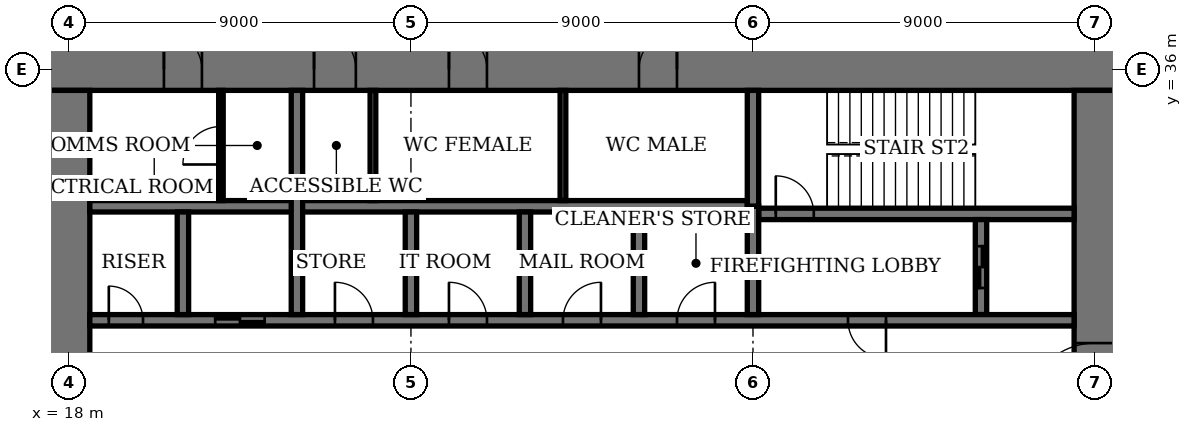
"""IFC4 building model, lengths in metres.
Left out: names, types, materials, properties, quantities, classifications, styles, units other than length and angle.
Written with IfcOpenShell. Run it as: python <this file> out.ifc"""

import sys

from ifc_helpers import new_model, si_unit, direction, frame, frame_2d, origin, place, context, subcontext, project, spatial, rectangle, extrude, element, fill, save


model = new_model("IFC4")
c1 = context("Model", 3, precision=1e-05, world=origin(), true_north=direction((0.0, 1.0)))
c2 = subcontext(c1, "Body", "Model", "MODEL_VIEW")
j1 = project(units=[si_unit("LENGTHUNIT", "METRE"), si_unit("PLANEANGLEUNIT", "RADIAN")], contexts=[c1])
p1 = place(None, origin())
s1 = spatial("IfcSite", under=j1, at=p1, CompositionType="ELEMENT")
p2 = place(p1, origin())
s2 = spatial("IfcBuilding", under=s1, at=p2, CompositionType="ELEMENT")
p3 = place(p2, frame((0.0, 0.0, 279.4)))
s3 = spatial("IfcBuildingStorey", under=s2, at=p3, CompositionType="ELEMENT", Elevation=279.4)
p4 = place(p3, frame((45.55, 36.0, 0.0), z_axis=(0.0, 0.0, 1.0), x_axis=(-1.0, 0.0, 0.0)))
e1 = element("IfcWall", 1, at=p4, inside=s3, PredefinedType="SHEAR", context=c2, shape_type="SweptSolid", body=[
    extrude(rectangle(XDim=28.1, YDim=1.1, at=frame_2d((14.05, 0.0))), origin(), (0.0, 0.0, 1.0), 4.0),
])
p5 = place(p4, frame((11.55, 0.0, 0.0)))
e2 = element("IfcOpeningElement", 2, at=p5, cuts=e1, PredefinedType="OPENING", context=c2, shape_type="SweptSolid", body=[
    extrude(rectangle(XDim=1.0, YDim=2.4, at=frame_2d((0.5, 1.2))), frame((0.0, 0.56, 0.0), z_axis=(0.0, -1.0, 0.0), x_axis=(1.0, 0.0, 0.0)), (0.0, 0.0, 1.0), 1.12),
])
p6 = place(p4, frame((16.55, 0.0, 0.0)))
e3 = element("IfcOpeningElement", 3, at=p6, cuts=e1, PredefinedType="OPENING", context=c2, shape_type="SweptSolid", body=[
    extrude(rectangle(XDim=1.0, YDim=2.4, at=frame_2d((0.5, 1.2))), frame((0.0, 0.56, 0.0), z_axis=(0.0, -1.0, 0.0), x_axis=(1.0, 0.0, 0.0)), (0.0, 0.0, 1.0), 1.12),
])
p7 = place(p4, frame((20.0, 0.0, 0.0)))
e4 = element("IfcOpeningElement", 4, at=p7, cuts=e1, PredefinedType="OPENING", context=c2, shape_type="SweptSolid", body=[
    extrude(rectangle(XDim=1.1, YDim=2.4, at=frame_2d((0.55, 1.2))), frame((0.0, 0.56, 0.0), z_axis=(0.0, -1.0, 0.0), x_axis=(1.0, 0.0, 0.0)), (0.0, 0.0, 1.0), 1.12),
])
p8 = place(p4, frame((24.05, 0.0, 0.0)))
e5 = element("IfcOpeningElement", 5, at=p8, cuts=e1, PredefinedType="OPENING", context=c2, shape_type="SweptSolid", body=[
    extrude(rectangle(XDim=1.0, YDim=2.4, at=frame_2d((0.5, 1.2))), frame((0.0, 0.56, 0.0), z_axis=(0.0, -1.0, 0.0), x_axis=(1.0, 0.0, 0.0)), (0.0, 0.0, 1.0), 1.12),
])
p9 = place(p3, frame((18.0, 35.45, 0.0), z_axis=(0.0, 0.0, 1.0), x_axis=(0.0, -1.0, 0.0)))
e6 = element("IfcWall", 6, at=p9, inside=s3, PredefinedType="SHEAR", context=c2, shape_type="SweptSolid", body=[
    extrude(rectangle(XDim=16.9, YDim=1.1, at=frame_2d((8.45, 0.0))), origin(), (0.0, 0.0, 1.0), 4.0),
])
p10 = place(p9, frame((8.45, 0.0, 0.0)))
e7 = element("IfcOpeningElement", 7, at=p10, cuts=e6, PredefinedType="OPENING", context=c2, shape_type="SweptSolid", body=[
    extrude(rectangle(XDim=1.8, YDim=2.4, at=frame_2d((0.9, 1.2))), frame((0.0, 0.56, 0.0), z_axis=(0.0, -1.0, 0.0), x_axis=(1.0, 0.0, 0.0)), (0.0, 0.0, 1.0), 1.12),
])
p11 = place(p3, frame((45.0, 18.55, 0.0), z_axis=(0.0, 0.0, 1.0), x_axis=(0.0, 1.0, 0.0)))
e8 = element("IfcWall", 8, at=p11, inside=s3, PredefinedType="SHEAR", context=c2, shape_type="SweptSolid", body=[
    extrude(rectangle(XDim=16.9, YDim=1.1, at=frame_2d((8.45, 0.0))), origin(), (0.0, 0.0, 1.0), 4.0),
])
p12 = place(p11, frame((8.45, 0.0, 0.0)))
e9 = element("IfcOpeningElement", 9, at=p12, cuts=e8, PredefinedType="OPENING", context=c2, shape_type="SweptSolid", body=[
    extrude(rectangle(XDim=1.8, YDim=2.4, at=frame_2d((0.9, 1.2))), frame((0.0, 0.56, 0.0), z_axis=(0.0, -1.0, 0.0), x_axis=(1.0, 0.0, 0.0)), (0.0, 0.0, 1.0), 1.12),
])
p13 = place(p3, frame((36.15, 32.2, 0.0), z_axis=(0.0, 0.0, 1.0), x_axis=(1.0, 0.0, 0.0)))
e10 = element("IfcWall", 10, at=p13, inside=s3, PredefinedType="SHEAR", context=c2, shape_type="SweptSolid", body=[
    extrude(rectangle(XDim=8.3, YDim=0.3, at=frame_2d((4.15, 0.0))), origin(), (0.0, 0.0, 1.0), 4.0),
])
p14 = place(p13, frame((0.45, 0.0, 0.0)))
e11 = element("IfcOpeningElement", 11, at=p14, cuts=e10, PredefinedType="OPENING", context=c2, shape_type="SweptSolid", body=[
    extrude(rectangle(XDim=1.0, YDim=2.4, at=frame_2d((0.5, 1.2))), frame((0.0, 0.16, 0.0), z_axis=(0.0, -1.0, 0.0), x_axis=(1.0, 0.0, 0.0)), (0.0, 0.0, 1.0), 0.32),
])
p15 = place(p3, frame((36.0, 32.4, 0.0), z_axis=(0.0, 0.0, 1.0), x_axis=(0.0, 1.0, 0.0)))
e12 = element("IfcWall", 12, at=p15, inside=s3, PredefinedType="SHEAR", context=c2, shape_type="SweptSolid", body=[
    extrude(rectangle(XDim=3.05, YDim=0.3, at=frame_2d((1.525, 0.0))), origin(), (0.0, 0.0, 1.0), 4.0),
])
p16 = place(p3, frame((42.0, 29.55, 0.0), z_axis=(0.0, 0.0, 1.0), x_axis=(0.0, 1.0, 0.0)))
e13 = element("IfcWall", 13, at=p16, inside=s3, PredefinedType="SHEAR", context=c2, shape_type="SweptSolid", body=[
    extrude(rectangle(XDim=2.5, YDim=0.3, at=frame_2d((1.25, 0.0))), origin(), (0.0, 0.0, 1.0), 4.0),
])
p17 = place(p16, frame((0.7, 0.0, 0.0)))
e14 = element("IfcOpeningElement", 14, at=p17, cuts=e13, PredefinedType="OPENING", context=c2, shape_type="SweptSolid", body=[
    extrude(rectangle(XDim=1.1, YDim=2.4, at=frame_2d((0.55, 1.2))), frame((0.0, 0.16, 0.0), z_axis=(0.0, -1.0, 0.0), x_axis=(1.0, 0.0, 0.0)), (0.0, 0.0, 1.0), 0.32),
])
p18 = place(p3, frame((18.55, 29.4, 0.0), z_axis=(0.0, 0.0, 1.0), x_axis=(1.0, 0.0, 0.0)))
e15 = element("IfcWall", 15, at=p18, inside=s3, PredefinedType="SHEAR", context=c2, shape_type="SweptSolid", body=[
    extrude(rectangle(XDim=25.9, YDim=0.3, at=frame_2d((12.95, 0.0))), origin(), (0.0, 0.0, 1.0), 4.0),
])
p19 = place(p18, frame((19.95, 0.0, 0.0)))
e16 = element("IfcOpeningElement", 16, at=p19, cuts=e15, PredefinedType="OPENING", context=c2, shape_type="SweptSolid", body=[
    extrude(rectangle(XDim=1.0, YDim=2.4, at=frame_2d((0.5, 1.2))), frame((0.0, 0.16, 0.0), z_axis=(0.0, -1.0, 0.0), x_axis=(1.0, 0.0, 0.0)), (0.0, 0.0, 1.0), 0.32),
])
p20 = place(p18, frame((0.5, 0.0, 0.0)))
e17 = element("IfcOpeningElement", 17, at=p20, cuts=e15, PredefinedType="OPENING", context=c2, shape_type="SweptSolid", body=[
    extrude(rectangle(XDim=0.9, YDim=2.1, at=frame_2d((0.45, 1.05))), frame((0.0, 0.16, 0.0), z_axis=(0.0, -1.0, 0.0), x_axis=(1.0, 0.0, 0.0)), (0.0, 0.0, 1.0), 0.32),
])
p21 = place(p18, frame((15.45, 0.0, 0.0)))
e18 = element("IfcOpeningElement", 18, at=p21, cuts=e15, PredefinedType="OPENING", context=c2, shape_type="SweptSolid", body=[
    extrude(rectangle(XDim=1.0, YDim=2.4, at=frame_2d((0.5, 1.2))), frame((0.0, 0.16, 0.0), z_axis=(0.0, -1.0, 0.0), x_axis=(1.0, 0.0, 0.0)), (0.0, 0.0, 1.0), 0.32),
])
p22 = place(p18, frame((12.45, 0.0, 0.0)))
e19 = element("IfcOpeningElement", 19, at=p22, cuts=e15, PredefinedType="OPENING", context=c2, shape_type="SweptSolid", body=[
    extrude(rectangle(XDim=1.0, YDim=2.4, at=frame_2d((0.5, 1.2))), frame((0.0, 0.16, 0.0), z_axis=(0.0, -1.0, 0.0), x_axis=(1.0, 0.0, 0.0)), (0.0, 0.0, 1.0), 0.32),
])
p23 = place(p18, frame((9.45, 0.0, 0.0)))
e20 = element("IfcOpeningElement", 20, at=p23, cuts=e15, PredefinedType="OPENING", context=c2, shape_type="SweptSolid", body=[
    extrude(rectangle(XDim=1.0, YDim=2.4, at=frame_2d((0.5, 1.2))), frame((0.0, 0.16, 0.0), z_axis=(0.0, -1.0, 0.0), x_axis=(1.0, 0.0, 0.0)), (0.0, 0.0, 1.0), 0.32),
])
p24 = place(p18, frame((6.45, 0.0, 0.0)))
e21 = element("IfcOpeningElement", 21, at=p24, cuts=e15, PredefinedType="OPENING", context=c2, shape_type="SweptSolid", body=[
    extrude(rectangle(XDim=1.0, YDim=2.4, at=frame_2d((0.5, 1.2))), frame((0.0, 0.16, 0.0), z_axis=(0.0, -1.0, 0.0), x_axis=(1.0, 0.0, 0.0)), (0.0, 0.0, 1.0), 0.32),
])
p25 = place(p18, frame((3.3, 0.0, 0.0)))
e22 = element("IfcOpeningElement", 22, at=p25, cuts=e15, PredefinedType="OPENING", context=c2, shape_type="SweptSolid", body=[
    extrude(rectangle(XDim=1.3, YDim=2.4, at=frame_2d((0.65, 1.2))), frame((0.0, 0.16, 0.0), z_axis=(0.0, -1.0, 0.0), x_axis=(1.0, 0.0, 0.0)), (0.0, 0.0, 1.0), 0.32),
])
p26 = place(p3, frame((18.55, 32.4, 0.0), z_axis=(0.0, 0.0, 1.0), x_axis=(1.0, 0.0, 0.0)))
e23 = element("IfcWall", 23, at=p26, inside=s3, PredefinedType="SHEAR", context=c2, shape_type="SweptSolid", body=[
    extrude(rectangle(XDim=17.3, YDim=0.3, at=frame_2d((8.65, 0.0))), origin(), (0.0, 0.0, 1.0), 4.0),
])
for number, where, z_axis, x_axis in (
    (24, (33.0, 29.55, 0.0), (0.0, 0.0, 1.0), (0.0, 1.0, 0.0)),
    (25, (30.0, 29.55, 0.0), (0.0, 0.0, 1.0), (0.0, 1.0, 0.0)),
    (26, (27.0, 29.55, 0.0), (0.0, 0.0, 1.0), (0.0, 1.0, 0.0)),
):
    element("IfcWall", number, at=place(p3, frame(where, z_axis=z_axis, x_axis=x_axis)), inside=s3, PredefinedType="SHEAR", context=c2, shape_type="SweptSolid", body=[
        extrude(rectangle(XDim=2.7, YDim=0.3, at=frame_2d((1.35, 0.0))), origin(), (0.0, 0.0, 1.0), 4.0),
    ])
p27 = place(p3, frame((24.0, 29.55, 0.0), z_axis=(0.0, 0.0, 1.0), x_axis=(0.0, 1.0, 0.0)))
e27 = element("IfcWall", 27, at=p27, inside=s3, PredefinedType="SHEAR", context=c2, shape_type="SweptSolid", body=[
    extrude(rectangle(XDim=5.9, YDim=0.3, at=frame_2d((2.95, 0.0))), origin(), (0.0, 0.0, 1.0), 4.0),
])
p28 = place(p3, frame((21.0, 29.55, 0.0), z_axis=(0.0, 0.0, 1.0), x_axis=(0.0, 1.0, 0.0)))
e28 = element("IfcWall", 28, at=p28, inside=s3, PredefinedType="SHEAR", context=c2, shape_type="SweptSolid", body=[
    extrude(rectangle(XDim=2.7, YDim=0.3, at=frame_2d((1.35, 0.0))), origin(), (0.0, 0.0, 1.0), 4.0),
])
p29 = place(p3, frame((36.0, 29.55, 0.0), z_axis=(0.0, 0.0, 1.0), x_axis=(0.0, 1.0, 0.0)))
e29 = element("IfcWall", 29, at=p29, inside=s3, PredefinedType="SHEAR", context=c2, shape_type="SweptSolid", body=[
    extrude(rectangle(XDim=2.85, YDim=0.3, at=frame_2d((1.425, 0.0))), origin(), (0.0, 0.0, 1.0), 4.0),
])
for number, where, z_axis, x_axis in (
    (30, (31.0, 32.55, 0.0), (0.0, 0.0, 1.0), (0.0, 1.0, 0.0)),
    (31, (26.0, 32.55, 0.0), (0.0, 0.0, 1.0), (0.0, 1.0, 0.0)),
):
    element("IfcWall", number, at=place(p3, frame(where, z_axis=z_axis, x_axis=x_axis)), inside=s3, PredefinedType="PARTITIONING", context=c2, shape_type="SweptSolid", body=[
        extrude(rectangle(XDim=2.9, YDim=0.15, at=frame_2d((1.45, 0.0))), origin(), (0.0, 0.0, 1.0), 3.75),
    ])
p30 = place(p3, frame((22.0, 32.55, 0.0), z_axis=(0.0, 0.0, 1.0), x_axis=(0.0, 1.0, 0.0)))
e32 = element("IfcWall", 32, at=p30, inside=s3, PredefinedType="PARTITIONING", context=c2, shape_type="SweptSolid", body=[
    extrude(rectangle(XDim=2.9, YDim=0.12, at=frame_2d((1.45, 0.0))), origin(), (0.0, 0.0, 1.0), 3.75),
])
p31 = place(p30, frame((0.95, 0.0, 0.0)))
e33 = element("IfcOpeningElement", 33, at=p31, cuts=e32, PredefinedType="OPENING", context=c2, shape_type="SweptSolid", body=[
    extrude(rectangle(XDim=1.0, YDim=2.4, at=frame_2d((0.5, 1.2))), frame((0.0, 0.07, 0.0), z_axis=(0.0, -1.0, 0.0), x_axis=(1.0, 0.0, 0.0)), (0.0, 0.0, 1.0), 0.14),
])
p32 = place(p12, origin())
e34 = element("IfcDoor", 34, at=p32, inside=s3, OperationType="DOUBLE_DOOR_DOUBLE_SWING", PredefinedType="DOOR", context=c2, shape_type="SweptSolid", body=[
    extrude(rectangle(XDim=1.8, YDim=2.4, at=frame_2d((0.9, 1.2))), frame((0.0, 0.03, 0.0), z_axis=(0.0, -1.0, 0.0), x_axis=(1.0, 0.0, 0.0)), (0.0, 0.0, 1.0), 0.06),
    extrude(rectangle(XDim=0.04, YDim=2.4, at=frame_2d((0.02, 1.2))), frame((0.0, 0.55, 0.0), z_axis=(0.0, -1.0, 0.0), x_axis=(1.0, 0.0, 0.0)), (0.0, 0.0, 1.0), 1.1),
    extrude(rectangle(XDim=0.04, YDim=2.4, at=frame_2d((1.78, 1.2))), frame((0.0, 0.55, 0.0), z_axis=(0.0, -1.0, 0.0), x_axis=(1.0, 0.0, 0.0)), (0.0, 0.0, 1.0), 1.1),
    extrude(rectangle(XDim=1.8, YDim=0.04, at=frame_2d((0.9, 2.38))), frame((0.0, 0.55, 0.0), z_axis=(0.0, -1.0, 0.0), x_axis=(1.0, 0.0, 0.0)), (0.0, 0.0, 1.0), 1.1),
])
fill(e9, e34)
p33 = place(p5, origin())
e35 = element("IfcDoor", 35, at=p33, inside=s3, OperationType="SINGLE_SWING_LEFT", PredefinedType="DOOR", context=c2, shape_type="SweptSolid", body=[
    extrude(rectangle(XDim=1.0, YDim=2.4, at=frame_2d((0.5, 1.2))), frame((0.0, 0.025, 0.0), z_axis=(0.0, -1.0, 0.0), x_axis=(1.0, 0.0, 0.0)), (0.0, 0.0, 1.0), 0.05),
    extrude(rectangle(XDim=0.04, YDim=2.4, at=frame_2d((0.02, 1.2))), frame((0.0, 0.4, 0.0), z_axis=(0.0, -1.0, 0.0), x_axis=(1.0, 0.0, 0.0)), (0.0, 0.0, 1.0), 0.8),
    extrude(rectangle(XDim=0.04, YDim=2.4, at=frame_2d((0.98, 1.2))), frame((0.0, 0.4, 0.0), z_axis=(0.0, -1.0, 0.0), x_axis=(1.0, 0.0, 0.0)), (0.0, 0.0, 1.0), 0.8),
    extrude(rectangle(XDim=1.0, YDim=0.04, at=frame_2d((0.5, 2.38))), frame((0.0, 0.4, 0.0), z_axis=(0.0, -1.0, 0.0), x_axis=(1.0, 0.0, 0.0)), (0.0, 0.0, 1.0), 0.8),
])
fill(e2, e35)
p34 = place(p6, origin())
e36 = element("IfcDoor", 36, at=p34, inside=s3, OperationType="SINGLE_SWING_RIGHT", PredefinedType="DOOR", context=c2, shape_type="SweptSolid", body=[
    extrude(rectangle(XDim=1.0, YDim=2.4, at=frame_2d((0.5, 1.2))), frame((0.0, 0.025, 0.0), z_axis=(0.0, -1.0, 0.0), x_axis=(1.0, 0.0, 0.0)), (0.0, 0.0, 1.0), 0.05),
    extrude(rectangle(XDim=0.04, YDim=2.4, at=frame_2d((0.02, 1.2))), frame((0.0, 0.4, 0.0), z_axis=(0.0, -1.0, 0.0), x_axis=(1.0, 0.0, 0.0)), (0.0, 0.0, 1.0), 0.8),
    extrude(rectangle(XDim=0.04, YDim=2.4, at=frame_2d((0.98, 1.2))), frame((0.0, 0.4, 0.0), z_axis=(0.0, -1.0, 0.0), x_axis=(1.0, 0.0, 0.0)), (0.0, 0.0, 1.0), 0.8),
    extrude(rectangle(XDim=1.0, YDim=0.04, at=frame_2d((0.5, 2.38))), frame((0.0, 0.4, 0.0), z_axis=(0.0, -1.0, 0.0), x_axis=(1.0, 0.0, 0.0)), (0.0, 0.0, 1.0), 0.8),
])
fill(e3, e36)
p35 = place(p7, origin())
e37 = element("IfcDoor", 37, at=p35, inside=s3, OperationType="SINGLE_SWING_RIGHT", PredefinedType="DOOR", context=c2, shape_type="SweptSolid", body=[
    extrude(rectangle(XDim=1.1, YDim=2.4, at=frame_2d((0.55, 1.2))), frame((0.0, 0.025, 0.0), z_axis=(0.0, -1.0, 0.0), x_axis=(1.0, 0.0, 0.0)), (0.0, 0.0, 1.0), 0.05),
    extrude(rectangle(XDim=0.04, YDim=2.4, at=frame_2d((0.02, 1.2))), frame((0.0, 0.44, 0.0), z_axis=(0.0, -1.0, 0.0), x_axis=(1.0, 0.0, 0.0)), (0.0, 0.0, 1.0), 0.88),
    extrude(rectangle(XDim=0.04, YDim=2.4, at=frame_2d((1.08, 1.2))), frame((0.0, 0.44, 0.0), z_axis=(0.0, -1.0, 0.0), x_axis=(1.0, 0.0, 0.0)), (0.0, 0.0, 1.0), 0.88),
    extrude(rectangle(XDim=1.1, YDim=0.04, at=frame_2d((0.55, 2.38))), frame((0.0, 0.44, 0.0), z_axis=(0.0, -1.0, 0.0), x_axis=(1.0, 0.0, 0.0)), (0.0, 0.0, 1.0), 0.88),
])
fill(e4, e37)
p36 = place(p8, origin())
e38 = element("IfcDoor", 38, at=p36, inside=s3, OperationType="SINGLE_SWING_RIGHT", PredefinedType="DOOR", context=c2, shape_type="SweptSolid", body=[
    extrude(rectangle(XDim=1.0, YDim=2.4, at=frame_2d((0.5, 1.2))), frame((0.0, 0.025, 0.0), z_axis=(0.0, -1.0, 0.0), x_axis=(1.0, 0.0, 0.0)), (0.0, 0.0, 1.0), 0.05),
    extrude(rectangle(XDim=0.04, YDim=2.4, at=frame_2d((0.02, 1.2))), frame((0.0, 0.4, 0.0), z_axis=(0.0, -1.0, 0.0), x_axis=(1.0, 0.0, 0.0)), (0.0, 0.0, 1.0), 0.8),
    extrude(rectangle(XDim=0.04, YDim=2.4, at=frame_2d((0.98, 1.2))), frame((0.0, 0.4, 0.0), z_axis=(0.0, -1.0, 0.0), x_axis=(1.0, 0.0, 0.0)), (0.0, 0.0, 1.0), 0.8),
    extrude(rectangle(XDim=1.0, YDim=0.04, at=frame_2d((0.5, 2.38))), frame((0.0, 0.4, 0.0), z_axis=(0.0, -1.0, 0.0), x_axis=(1.0, 0.0, 0.0)), (0.0, 0.0, 1.0), 0.8),
])
fill(e5, e38)
p37 = place(p14, origin())
e39 = element("IfcDoor", 39, at=p37, inside=s3, OperationType="SINGLE_SWING_RIGHT", PredefinedType="DOOR", context=c2, shape_type="SweptSolid", body=[
    extrude(rectangle(XDim=1.0, YDim=2.4, at=frame_2d((0.5, 1.2))), frame((0.0, 0.03, 0.0), z_axis=(0.0, -1.0, 0.0), x_axis=(1.0, 0.0, 0.0)), (0.0, 0.0, 1.0), 0.06),
])
fill(e11, e39)
p38 = place(p19, origin())
e40 = element("IfcDoor", 40, at=p38, inside=s3, OperationType="SINGLE_SWING_RIGHT", PredefinedType="DOOR", context=c2, shape_type="SweptSolid", body=[
    extrude(rectangle(XDim=1.0, YDim=2.4, at=frame_2d((0.5, 1.2))), frame((0.0, 0.03, 0.0), z_axis=(0.0, -1.0, 0.0), x_axis=(1.0, 0.0, 0.0)), (0.0, 0.0, 1.0), 0.06),
])
fill(e16, e40)
p39 = place(p20, origin())
e41 = element("IfcDoor", 41, at=p39, inside=s3, OperationType="SINGLE_SWING_RIGHT", PredefinedType="DOOR", context=c2, shape_type="SweptSolid", body=[
    extrude(rectangle(XDim=0.9, YDim=2.1, at=frame_2d((0.45, 1.05))), frame((0.0, 0.03, 0.0), z_axis=(0.0, -1.0, 0.0), x_axis=(1.0, 0.0, 0.0)), (0.0, 0.0, 1.0), 0.06),
])
fill(e17, e41)
p40 = place(p31, origin())
e42 = element("IfcDoor", 42, at=p40, inside=s3, OperationType="SINGLE_SWING_RIGHT", PredefinedType="DOOR", context=c2, shape_type="SweptSolid", body=[
    extrude(rectangle(XDim=1.0, YDim=2.4, at=frame_2d((0.5, 1.2))), frame((0.0, 0.03, 0.0), z_axis=(0.0, -1.0, 0.0), x_axis=(1.0, 0.0, 0.0)), (0.0, 0.0, 1.0), 0.06),
])
fill(e33, e42)
p41 = place(p21, origin())
e43 = element("IfcDoor", 43, at=p41, inside=s3, OperationType="SINGLE_SWING_LEFT", PredefinedType="DOOR", context=c2, shape_type="SweptSolid", body=[
    extrude(rectangle(XDim=1.0, YDim=2.4, at=frame_2d((0.5, 1.2))), frame((0.0, 0.03, 0.0), z_axis=(0.0, -1.0, 0.0), x_axis=(1.0, 0.0, 0.0)), (0.0, 0.0, 1.0), 0.06),
])
fill(e18, e43)
p42 = place(p22, origin())
e44 = element("IfcDoor", 44, at=p42, inside=s3, OperationType="SINGLE_SWING_LEFT", PredefinedType="DOOR", context=c2, shape_type="SweptSolid", body=[
    extrude(rectangle(XDim=1.0, YDim=2.4, at=frame_2d((0.5, 1.2))), frame((0.0, 0.03, 0.0), z_axis=(0.0, -1.0, 0.0), x_axis=(1.0, 0.0, 0.0)), (0.0, 0.0, 1.0), 0.06),
])
fill(e19, e44)
p43 = place(p23, origin())
e45 = element("IfcDoor", 45, at=p43, inside=s3, OperationType="SINGLE_SWING_RIGHT", PredefinedType="DOOR", context=c2, shape_type="SweptSolid", body=[
    extrude(rectangle(XDim=1.0, YDim=2.4, at=frame_2d((0.5, 1.2))), frame((0.0, 0.03, 0.0), z_axis=(0.0, -1.0, 0.0), x_axis=(1.0, 0.0, 0.0)), (0.0, 0.0, 1.0), 0.06),
])
fill(e20, e45)
p44 = place(p24, origin())
e46 = element("IfcDoor", 46, at=p44, inside=s3, OperationType="SINGLE_SWING_RIGHT", PredefinedType="DOOR", context=c2, shape_type="SweptSolid", body=[
    extrude(rectangle(XDim=1.0, YDim=2.4, at=frame_2d((0.5, 1.2))), frame((0.0, 0.03, 0.0), z_axis=(0.0, -1.0, 0.0), x_axis=(1.0, 0.0, 0.0)), (0.0, 0.0, 1.0), 0.06),
])
fill(e21, e46)
p45 = place(p25, origin())
e47 = element("IfcDoor", 47, at=p45, inside=s3, OperationType="DOUBLE_DOOR_SLIDING", PredefinedType="DOOR", context=c2, shape_type="SweptSolid", body=[
    extrude(rectangle(XDim=1.3, YDim=2.4, at=frame_2d((0.65, 1.2))), frame((0.0, 0.02, 0.0), z_axis=(0.0, -1.0, 0.0), x_axis=(1.0, 0.0, 0.0)), (0.0, 0.0, 1.0), 0.04),
])
fill(e22, e47)
p46 = place(p17, origin())
e48 = element("IfcDoor", 48, at=p46, inside=s3, OperationType="DOUBLE_DOOR_SLIDING", PredefinedType="DOOR", context=c2, shape_type="SweptSolid", body=[
    extrude(rectangle(XDim=1.1, YDim=2.4, at=frame_2d((0.55, 1.2))), frame((0.0, 0.03, 0.0), z_axis=(0.0, -1.0, 0.0), x_axis=(1.0, 0.0, 0.0)), (0.0, 0.0, 1.0), 0.06),
])
fill(e14, e48)
save(model, sys.argv[1])
